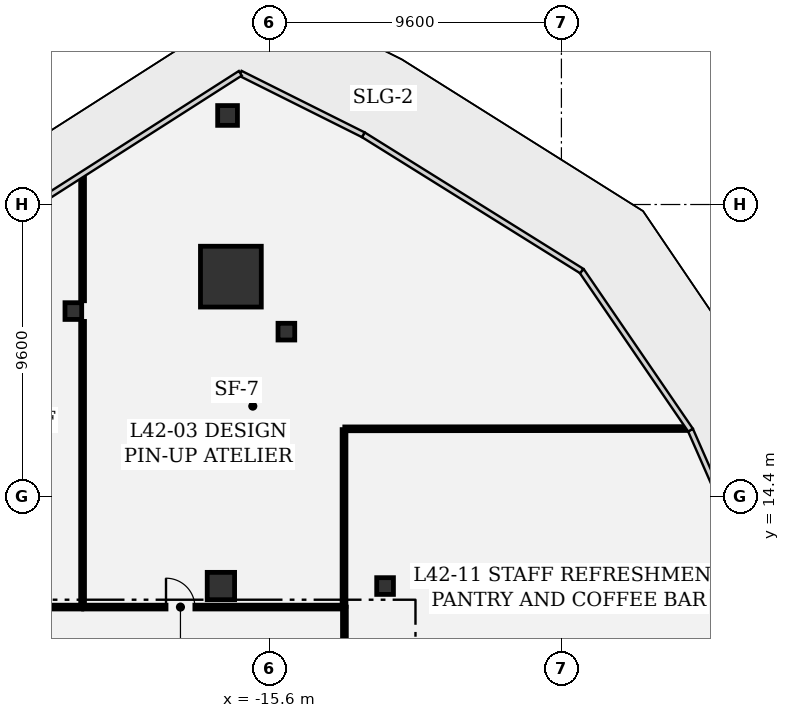
"""IFC4 building model, lengths in metres.
Left out: names, types, materials, properties, quantities, classifications, styles, units other than length and angle.
Written with IfcOpenShell. Run it as: python <this file> out.ifc"""

import sys

from ifc_helpers import new_model, si_unit, direction, frame, frame_2d, origin, origin_2d, place, context, subcontext, project, spatial, rectangle, extrude, element, fill, save


model = new_model("IFC4")
c1 = context("Model", 3, precision=1e-05, world=origin(), true_north=direction((0.0, 1.0)))
c2 = subcontext(c1, "Body", "Model", "MODEL_VIEW")
j1 = project(units=[si_unit("LENGTHUNIT", "METRE"), si_unit("PLANEANGLEUNIT", "RADIAN")], contexts=[c1])
p1 = place(None, origin())
s1 = spatial("IfcSite", under=j1, at=p1, CompositionType="ELEMENT")
p2 = place(p1, origin())
s2 = spatial("IfcBuilding", under=s1, at=p2, CompositionType="ELEMENT")
p3 = place(p2, frame((0.0, 0.0, 184.8)))
s3 = spatial("IfcBuildingStorey", under=s2, at=p3, CompositionType="ELEMENT", Elevation=184.8)
p4 = place(p3, frame((-16.872, 21.627, 0.0), z_axis=(0.0, 0.0, 1.0), x_axis=(1.0, 0.0, 0.0)))
e1 = element("IfcColumn", 1, at=p4, inside=s3, PredefinedType="COLUMN", context=c2, shape_type="SweptSolid", body=[
    extrude(rectangle(XDim=2.0, YDim=2.0, at=origin_2d()), origin(), (0.0, 0.0, 1.0), 4.05),
])
p5 = place(p3, frame((-17.2, 11.45, 0.0), z_axis=(0.0, 0.0, 1.0), x_axis=(1.0, 0.0, 0.0)))
e2 = element("IfcColumn", 2, at=p5, inside=s3, PredefinedType="COLUMN", context=c2, shape_type="SweptSolid", body=[
    extrude(rectangle(XDim=0.9, YDim=0.9, at=origin_2d()), origin(), (0.0, 0.0, 1.0), 4.05),
])
p6 = place(p3, frame((-16.981, 26.929, 0.0), z_axis=(0.0, 0.0, 1.0), x_axis=(1.0, 0.0, 0.0)))
e3 = element("IfcColumn", 3, at=p6, inside=s3, PredefinedType="COLUMN", context=c2, shape_type="SweptSolid", body=[
    extrude(rectangle(XDim=0.65, YDim=0.65, at=origin_2d()), origin(), (0.0, 0.0, 1.0), 4.05),
])
for number, where, z_axis, x_axis in (
    (4, (-22.053, 20.495, 0.0), (0.0, 0.0, 1.0), (1.0, 0.0, 0.0)),
    (5, (-15.046, 19.818, 0.0), (0.0, 0.0, 1.0), (1.0, 0.0, 0.0)),
    (6, (-11.8, 11.45, 0.0), (0.0, 0.0, 1.0), (1.0, 0.0, 0.0)),
):
    element("IfcColumn", number, at=place(p3, frame(where, z_axis=z_axis, x_axis=x_axis)), inside=s3, PredefinedType="COLUMN", context=c2, shape_type="SweptSolid", body=[
        extrude(rectangle(XDim=0.55, YDim=0.55, at=origin_2d()), origin(), (0.0, 0.0, 1.0), 4.05),
    ])
p7 = place(p3, frame((-28.138, 10.758, 0.0), z_axis=(0.0, 0.0, 1.0), x_axis=(1.0, 0.0, 0.0)))
e7 = element("IfcWall", 7, at=p7, inside=s3, PredefinedType="PARTITIONING", context=c2, shape_type="SweptSolid", body=[
    extrude(rectangle(XDim=6.363, YDim=0.125, at=frame_2d((3.182, 0.0))), origin(), (0.0, 0.0, 1.0), 3.78),
])
p8 = place(p7, frame((2.707, 0.0, 0.0)))
e8 = element("IfcOpeningElement", 8, at=p8, cuts=e7, PredefinedType="OPENING", context=c2, shape_type="SweptSolid", body=[
    extrude(rectangle(XDim=0.95, YDim=2.15, at=frame_2d((0.475, 1.075))), frame((0.0, 0.073, 0.0), z_axis=(0.0, -1.0, 0.0), x_axis=(1.0, 0.0, 0.0)), (0.0, 0.0, 1.0), 0.145),
])
p9 = place(p3, frame((-21.75, 10.783, 0.0), z_axis=(0.0, 0.0, 1.0), x_axis=(0.0, 1.0, 0.0)))
e9 = element("IfcWall", 9, at=p9, inside=s3, PredefinedType="PARTITIONING", context=c2, shape_type="SweptSolid", body=[
    extrude(rectangle(XDim=9.372, YDim=0.125, at=frame_2d((4.686, 0.0))), origin(), (0.0, 0.0, 1.0), 2.895),
])
p10 = place(p3, frame((-21.75, 20.835, 0.0), z_axis=(0.0, 0.0, 1.0), x_axis=(0.0, 1.0, 0.0)))
e10 = element("IfcWall", 10, at=p10, inside=s3, PredefinedType="PARTITIONING", context=c2, shape_type="SweptSolid", body=[
    extrude(rectangle(XDim=4.085, YDim=0.125, at=frame_2d((2.043, 0.0))), origin(), (0.0, 0.0, 1.0), 3.78),
])
p11 = place(p3, frame((-13.15, 10.783, 0.0), z_axis=(0.0, 0.0, 1.0), x_axis=(0.0, 1.0, 0.0)))
e11 = element("IfcWall", 11, at=p11, inside=s3, PredefinedType="PARTITIONING", context=c2, shape_type="SweptSolid", body=[
    extrude(rectangle(XDim=5.812, YDim=0.125, at=frame_2d((2.906, 0.0))), origin(), (0.0, 0.0, 1.0), 2.9),
])
p12 = place(p3, frame((-13.125, 16.621, 0.0), z_axis=(0.0, 0.0, 1.0), x_axis=(0.999999660387, 0.000824151711, 0.0)))
e12 = element("IfcWall", 12, at=p12, inside=s3, PredefinedType="PARTITIONING", context=c2, shape_type="SweptSolid", body=[
    extrude(rectangle(XDim=11.257, YDim=0.125, at=frame_2d((5.628, 0.0))), origin(), (0.0, 0.0, 1.0), 3.78),
])
p13 = place(p3, frame((-21.717, 10.758, 0.0), z_axis=(0.0, 0.0, 1.0), x_axis=(1.0, 0.0, 0.0)))
e13 = element("IfcWall", 13, at=p13, inside=s3, PredefinedType="PARTITIONING", context=c2, shape_type="SweptSolid", body=[
    extrude(rectangle(XDim=8.542, YDim=0.125, at=frame_2d((4.271, 0.0))), origin(), (0.0, 0.0, 1.0), 3.344),
])
p14 = place(p13, frame((2.711, 0.0, 0.0)))
e14 = element("IfcOpeningElement", 14, at=p14, cuts=e13, PredefinedType="OPENING", context=c2, shape_type="SweptSolid", body=[
    extrude(rectangle(XDim=0.95, YDim=2.15, at=frame_2d((0.475, 1.075))), frame((0.0, 0.073, 0.0), z_axis=(0.0, -1.0, 0.0), x_axis=(1.0, 0.0, 0.0)), (0.0, 0.0, 1.0), 0.145),
])
p15 = place(p3, frame((-13.138, 10.758, 0.0), z_axis=(0.0, 0.0, 1.0), x_axis=(0.000806501382, -0.999999674778, 0.0)))
e15 = element("IfcWall", 15, at=p15, inside=s3, PredefinedType="PARTITIONING", context=c2, shape_type="SweptSolid", body=[
    extrude(rectangle(XDim=3.935, YDim=0.125, at=frame_2d((1.968, 0.0))), origin(), (0.0, 0.0, 1.0), 2.9),
])
p16 = place(p15, frame((1.493, 0.0, 0.0)))
e16 = element("IfcOpeningElement", 16, at=p16, cuts=e15, PredefinedType="OPENING", context=c2, shape_type="SweptSolid", body=[
    extrude(rectangle(XDim=0.95, YDim=2.15, at=frame_2d((0.475, 1.075))), frame((0.0, 0.073, 0.0), z_axis=(0.0, -1.0, 0.0), x_axis=(1.0, 0.0, 0.0)), (0.0, 0.0, 1.0), 0.145),
])
p17 = place(p14, origin())
e17 = element("IfcDoor", 17, at=p17, inside=s3, OperationType="SINGLE_SWING_LEFT", PredefinedType="DOOR", context=c2, shape_type="SweptSolid", body=[
    extrude(rectangle(XDim=0.95, YDim=2.15, at=frame_2d((0.475, 1.075))), frame((0.0, 0.025, 0.0), z_axis=(0.0, -1.0, 0.0), x_axis=(1.0, 0.0, 0.0)), (0.0, 0.0, 1.0), 0.05),
])
fill(e14, e17)
save(model, sys.argv[1])
